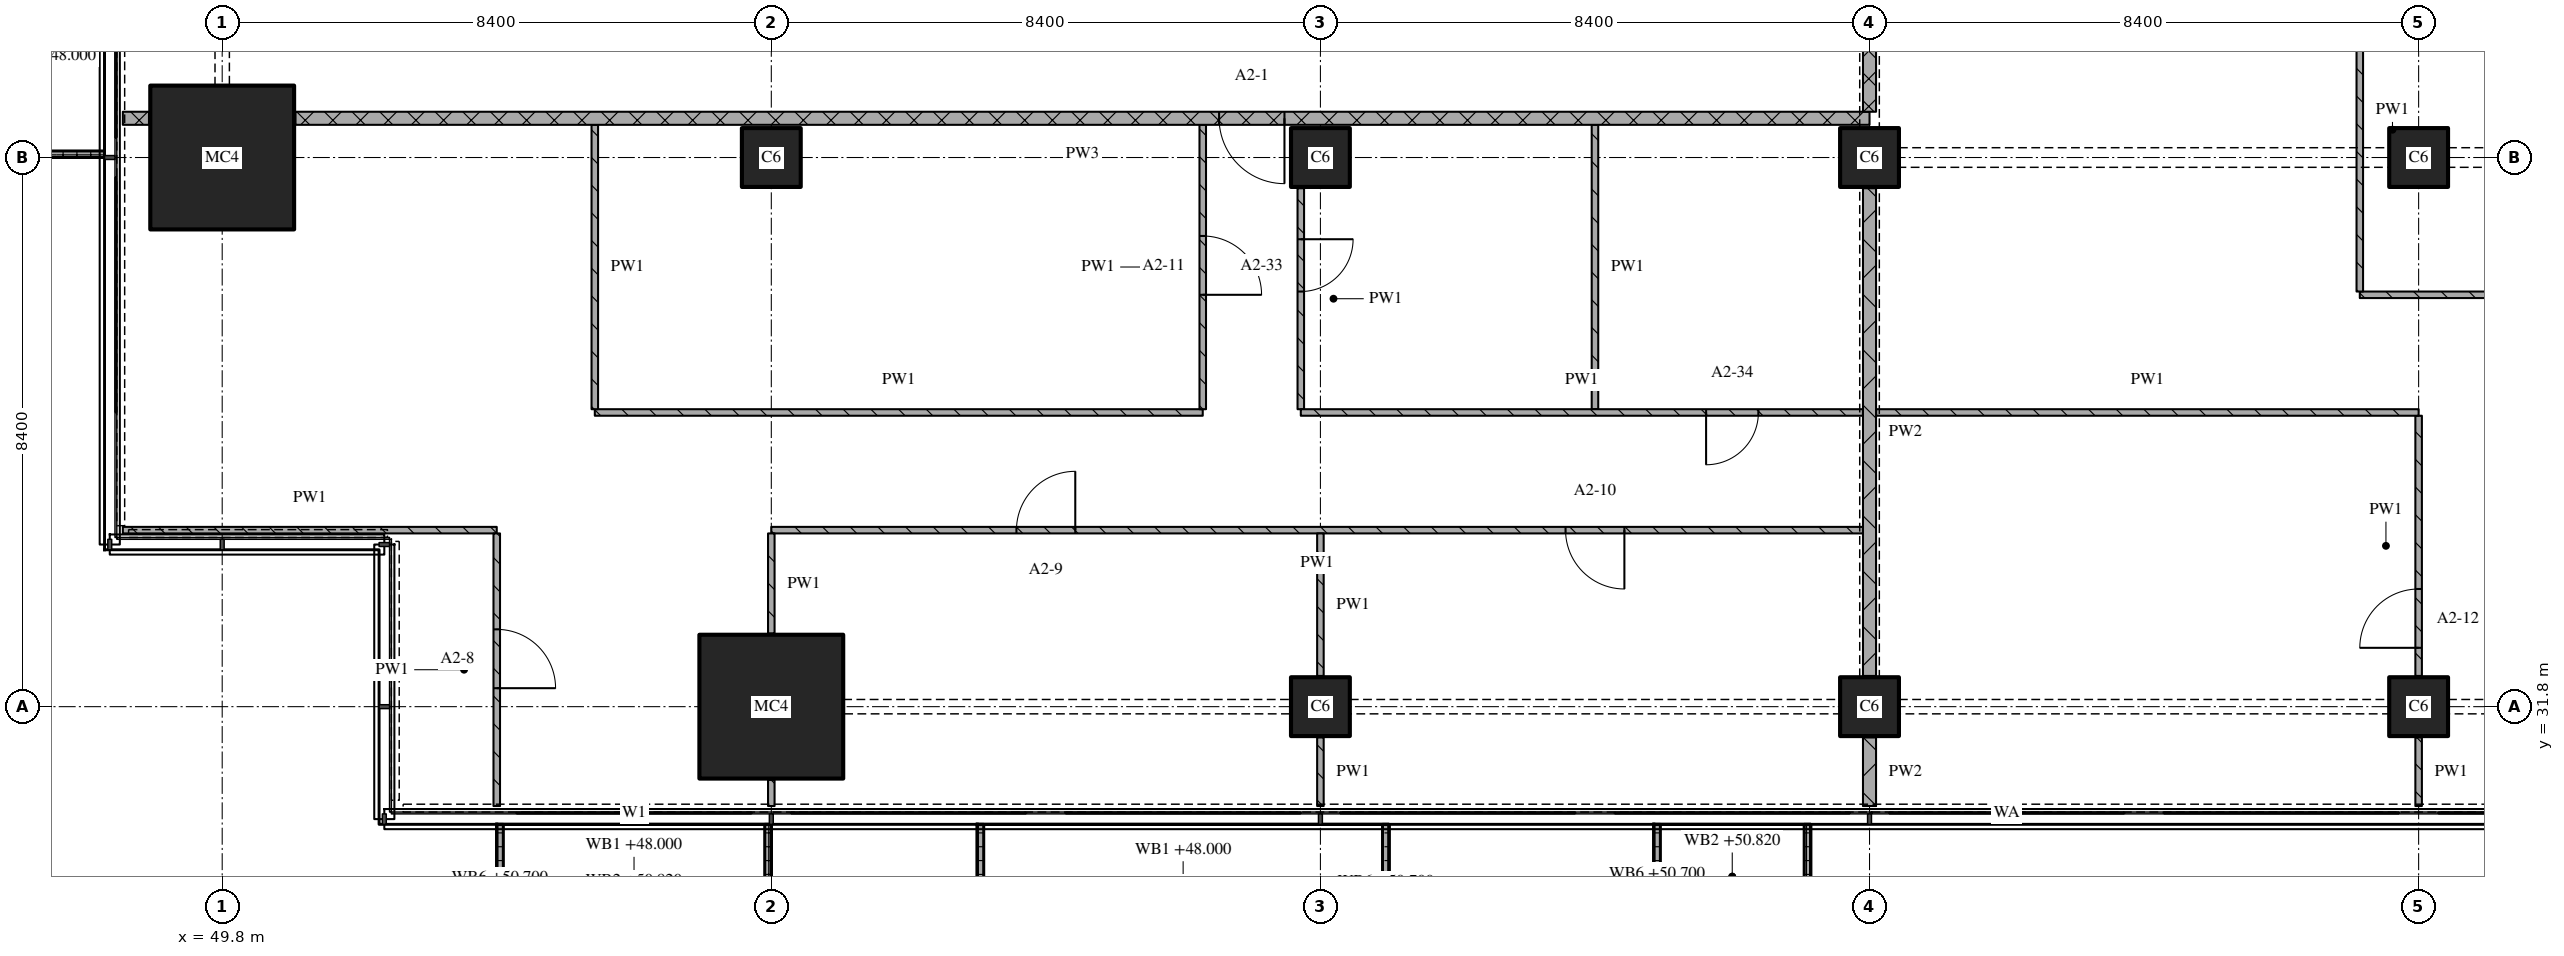
"""IFC4 building model, lengths in metres.
Left out: names, types, materials, properties, quantities, classifications, styles, units other than length and angle.
Written with IfcOpenShell. Run it as: python <this file> out.ifc"""

import sys

from ifc_helpers import new_model, si_unit, direction, frame, frame_2d, origin, origin_2d, place, context, subcontext, project, spatial, polyline, rectangle, outline, extrude, element, fill, save


model = new_model("IFC4")
c1 = context("Model", 3, precision=1e-05, world=origin(), true_north=direction((0.0, 1.0)))
c2 = subcontext(c1, "Body", "Model", "MODEL_VIEW")
j1 = project(units=[si_unit("LENGTHUNIT", "METRE"), si_unit("PLANEANGLEUNIT", "RADIAN")], contexts=[c1])
p1 = place(None, origin())
s1 = spatial("IfcSite", under=j1, at=p1, CompositionType="ELEMENT")
p2 = place(p1, origin())
s2 = spatial("IfcBuilding", under=s1, at=p2, CompositionType="ELEMENT")
p3 = place(p2, frame((0.0, 0.0, 48.0)))
s3 = spatial("IfcBuildingStorey", under=s2, at=p3, CompositionType="ELEMENT", Elevation=48.0)
for number, where, z_axis, x_axis in (
    (1, (49.8, 40.2, 0.0), (0.0, 0.0, 1.0), (1.0, 0.0, 0.0)),
    (2, (58.2, 31.8, 0.0), (0.0, 0.0, 1.0), (1.0, 0.0, 0.0)),
):
    element("IfcColumn", number, at=place(p3, frame(where, z_axis=z_axis, x_axis=x_axis)), inside=s3, PredefinedType="COLUMN", context=c2, shape_type="SweptSolid", body=[
        extrude(rectangle(XDim=2.2, YDim=2.2, at=origin_2d()), origin(), (0.0, 0.0, 1.0), 3.6),
    ])
for number, where, z_axis, x_axis in (
    (3, (58.2, 40.2, 0.0), (0.0, 0.0, 1.0), (1.0, 0.0, 0.0)),
    (4, (66.6, 31.8, 0.0), (0.0, 0.0, 1.0), (1.0, 0.0, 0.0)),
    (5, (66.6, 40.2, 0.0), (0.0, 0.0, 1.0), (1.0, 0.0, 0.0)),
    (6, (75.0, 31.8, 0.0), (0.0, 0.0, 1.0), (1.0, 0.0, 0.0)),
    (7, (75.0, 40.2, 0.0), (0.0, 0.0, 1.0), (1.0, 0.0, 0.0)),
    (8, (83.4, 31.8, 0.0), (0.0, 0.0, 1.0), (1.0, 0.0, 0.0)),
    (9, (83.4, 40.2, 0.0), (0.0, 0.0, 1.0), (1.0, 0.0, 0.0)),
):
    element("IfcColumn", number, at=place(p3, frame(where, z_axis=z_axis, x_axis=x_axis)), inside=s3, PredefinedType="COLUMN", context=c2, shape_type="SweptSolid", body=[
        extrude(rectangle(XDim=0.9, YDim=0.9, at=origin_2d()), origin(), (0.0, 0.0, 1.0), 3.6),
    ])
p4 = place(p3, origin())
e10 = element("IfcWall", 10, at=p4, inside=s3, PredefinedType="SOLIDWALL", context=c2, shape_type="SweptSolid", body=[
    extrude(outline(polyline([(54.0, 30.0), (54.1, 30.0), (54.1, 28.367), (58.1, 28.367), (58.1, 30.0), (58.2, 30.0), (58.2, 28.267), (54.0, 28.267), (54.0, 30.0)])), origin(), (0.0, 0.0, 1.0), 1.0),
])
p5 = place(p3, origin())
e11 = element("IfcWall", 11, at=p5, inside=s3, PredefinedType="SOLIDWALL", context=c2, shape_type="SweptSolid", body=[
    extrude(outline(polyline([(61.35, 30.0), (61.45, 30.0), (61.45, 28.233), (67.55, 28.233), (67.55, 30.0), (67.65, 30.0), (67.65, 28.133), (61.35, 28.133), (61.35, 30.0)])), origin(), (0.0, 0.0, 1.0), 1.0),
])
p6 = place(p3, origin())
e12 = element("IfcWall", 12, at=p6, inside=s3, PredefinedType="SOLIDWALL", context=c2, shape_type="SweptSolid", body=[
    extrude(outline(polyline([(71.7, 30.0), (71.8, 30.0), (71.8, 28.5), (74.0, 28.5), (74.0, 30.0), (74.1, 30.0), (74.1, 28.4), (71.7, 28.4), (71.7, 30.0)])), origin(), (0.0, 0.0, 1.0), 1.0),
])
p7 = place(p3, origin())
e13 = element("IfcWall", 13, at=p7, inside=s3, PredefinedType="SOLIDWALL", context=c2, shape_type="SweptSolid", body=[
    extrude(outline(polyline([(48.0, 44.4), (48.0, 44.3), (46.367, 44.3), (46.367, 40.3), (48.0, 40.3), (48.0, 40.2), (46.267, 40.2), (46.267, 44.4), (48.0, 44.4)])), origin(), (0.0, 0.0, 1.0), 1.0),
])
p8 = place(p3, frame((48.28, 34.5, 0.0), z_axis=(0.0, 0.0, 1.0), x_axis=(1.0, 0.0, 0.0)))
e14 = element("IfcWall", 14, at=p8, inside=s3, PredefinedType="PARTITIONING", context=c2, shape_type="SweptSolid", body=[
    extrude(rectangle(XDim=5.72, YDim=0.1, at=frame_2d((2.86, 0.0))), origin(), (0.0, 0.0, 1.0), 3.32),
])
p9 = place(p3, frame((74.9, 34.5, 0.0), z_axis=(0.0, 0.0, 1.0), x_axis=(-1.0, 0.0, 0.0)))
e15 = element("IfcWall", 15, at=p9, inside=s3, PredefinedType="PARTITIONING", context=c2, shape_type="SweptSolid", body=[
    extrude(rectangle(XDim=16.7, YDim=0.1, at=frame_2d((8.35, 0.0))), origin(), (0.0, 0.0, 1.0), 3.32),
])
p10 = place(p9, frame((3.65, 0.0, 0.0)))
e16 = element("IfcOpeningElement", 16, at=p10, cuts=e15, PredefinedType="OPENING", context=c2, shape_type="SweptSolid", body=[
    extrude(rectangle(XDim=0.9, YDim=2.1, at=frame_2d((0.45, 1.05))), frame((0.0, 0.06, 0.0), z_axis=(0.0, -1.0, 0.0), x_axis=(1.0, 0.0, 0.0)), (0.0, 0.0, 1.0), 0.12),
])
p11 = place(p9, frame((12.05, 0.0, 0.0)))
e17 = element("IfcOpeningElement", 17, at=p11, cuts=e15, PredefinedType="OPENING", context=c2, shape_type="SweptSolid", body=[
    extrude(rectangle(XDim=0.9, YDim=2.1, at=frame_2d((0.45, 1.05))), frame((0.0, 0.06, 0.0), z_axis=(0.0, -1.0, 0.0), x_axis=(1.0, 0.0, 0.0)), (0.0, 0.0, 1.0), 0.12),
])
p12 = place(p3, frame((55.5, 36.3, 0.0), z_axis=(0.0, 0.0, 1.0), x_axis=(1.0, 0.0, 0.0)))
e18 = element("IfcWall", 18, at=p12, inside=s3, PredefinedType="PARTITIONING", context=c2, shape_type="SweptSolid", body=[
    extrude(rectangle(XDim=9.3, YDim=0.1, at=frame_2d((4.65, 0.0))), origin(), (0.0, 0.0, 1.0), 3.32),
])
p13 = place(p3, frame((82.5, 38.1, 0.0), z_axis=(0.0, 0.0, 1.0), x_axis=(1.0, 0.0, 0.0)))
e19 = element("IfcWall", 19, at=p13, inside=s3, PredefinedType="PARTITIONING", context=c2, shape_type="SweptSolid", body=[
    extrude(rectangle(XDim=8.4, YDim=0.1, at=frame_2d((4.2, 0.0))), origin(), (0.0, 0.0, 1.0), 3.32),
])
p14 = place(p3, frame((48.28, 40.8, 0.0), z_axis=(0.0, 0.0, 1.0), x_axis=(1.0, 0.0, 0.0)))
e20 = element("IfcWall", 20, at=p14, inside=s3, PredefinedType="PARTITIONING", context=c2, shape_type="SweptSolid", body=[
    extrude(rectangle(XDim=0.4, YDim=0.2, at=frame_2d((0.2, 0.0))), origin(), (0.0, 0.0, 1.0), 3.32),
])
p15 = place(p3, frame((75.0, 40.8, 0.0), z_axis=(0.0, 0.0, 1.0), x_axis=(-1.0, 0.0, 0.0)))
e21 = element("IfcWall", 21, at=p15, inside=s3, PredefinedType="PARTITIONING", context=c2, shape_type="SweptSolid", body=[
    extrude(rectangle(XDim=24.08, YDim=0.2, at=frame_2d((12.04, 0.0))), origin(), (0.0, 0.0, 1.0), 3.32),
])
p16 = place(p15, frame((8.95, 0.0, 0.0)))
e22 = element("IfcOpeningElement", 22, at=p16, cuts=e21, PredefinedType="OPENING", context=c2, shape_type="SweptSolid", body=[
    extrude(rectangle(XDim=1.0, YDim=2.1, at=frame_2d((0.5, 1.05))), frame((0.0, 0.11, 0.0), z_axis=(0.0, -1.0, 0.0), x_axis=(1.0, 0.0, 0.0)), (0.0, 0.0, 1.0), 0.22),
])
p17 = place(p3, frame((54.0, 30.28, 0.0), z_axis=(0.0, 0.0, 1.0), x_axis=(0.0, 1.0, 0.0)))
e23 = element("IfcWall", 23, at=p17, inside=s3, PredefinedType="PARTITIONING", context=c2, shape_type="SweptSolid", body=[
    extrude(rectangle(XDim=4.17, YDim=0.1, at=frame_2d((2.085, 0.0))), origin(), (0.0, 0.0, 1.0), 3.32),
])
p18 = place(p17, frame((1.803, 0.0, 0.0)))
e24 = element("IfcOpeningElement", 24, at=p18, cuts=e23, PredefinedType="OPENING", context=c2, shape_type="SweptSolid", body=[
    extrude(rectangle(XDim=0.9, YDim=2.1, at=frame_2d((0.45, 1.05))), frame((0.0, 0.06, 0.0), z_axis=(0.0, -1.0, 0.0), x_axis=(1.0, 0.0, 0.0)), (0.0, 0.0, 1.0), 0.12),
])
p19 = place(p3, frame((55.5, 40.7, 0.0), z_axis=(0.0, 0.0, 1.0), x_axis=(0.0, -1.0, 0.0)))
e25 = element("IfcWall", 25, at=p19, inside=s3, PredefinedType="PARTITIONING", context=c2, shape_type="SweptSolid", body=[
    extrude(rectangle(XDim=4.35, YDim=0.1, at=frame_2d((2.175, 0.0))), origin(), (0.0, 0.0, 1.0), 3.32),
])
p20 = place(p3, frame((58.2, 30.68, 0.0), z_axis=(0.0, 0.0, 1.0), x_axis=(0.0, -1.0, 0.0)))
e26 = element("IfcWall", 26, at=p20, inside=s3, PredefinedType="PARTITIONING", context=c2, shape_type="SweptSolid", body=[
    extrude(rectangle(XDim=0.4, YDim=0.1, at=frame_2d((0.2, 0.0))), origin(), (0.0, 0.0, 1.0), 3.32),
])
p21 = place(p3, frame((58.2, 34.45, 0.0), z_axis=(0.0, 0.0, 1.0), x_axis=(0.0, -1.0, 0.0)))
e27 = element("IfcWall", 27, at=p21, inside=s3, PredefinedType="PARTITIONING", context=c2, shape_type="SweptSolid", body=[
    extrude(rectangle(XDim=1.53, YDim=0.1, at=frame_2d((0.765, 0.0))), origin(), (0.0, 0.0, 1.0), 3.32),
])
p22 = place(p3, frame((64.8, 36.35, 0.0), z_axis=(0.0, 0.0, 1.0), x_axis=(0.0, 1.0, 0.0)))
e28 = element("IfcWall", 28, at=p22, inside=s3, PredefinedType="PARTITIONING", context=c2, shape_type="SweptSolid", body=[
    extrude(rectangle(XDim=4.35, YDim=0.1, at=frame_2d((2.175, 0.0))), origin(), (0.0, 0.0, 1.0), 3.32),
])
p23 = place(p22, frame((1.75, 0.0, 0.0)))
e29 = element("IfcOpeningElement", 29, at=p23, cuts=e28, PredefinedType="OPENING", context=c2, shape_type="SweptSolid", body=[
    extrude(rectangle(XDim=0.9, YDim=2.1, at=frame_2d((0.45, 1.05))), frame((0.0, 0.06, 0.0), z_axis=(0.0, -1.0, 0.0), x_axis=(1.0, 0.0, 0.0)), (0.0, 0.0, 1.0), 0.12),
])
p24 = place(p3, frame((66.3, 39.73, 0.0), z_axis=(0.0, 0.0, 1.0), x_axis=(0.0, -1.0, 0.0)))
e30 = element("IfcWall", 30, at=p24, inside=s3, PredefinedType="PARTITIONING", context=c2, shape_type="SweptSolid", body=[
    extrude(rectangle(XDim=3.38, YDim=0.1, at=frame_2d((1.69, 0.0))), origin(), (0.0, 0.0, 1.0), 3.32),
])
p25 = place(p24, frame((0.78, 0.0, 0.0)))
e31 = element("IfcOpeningElement", 31, at=p25, cuts=e30, PredefinedType="OPENING", context=c2, shape_type="SweptSolid", body=[
    extrude(rectangle(XDim=0.8, YDim=2.1, at=frame_2d((0.4, 1.05))), frame((0.0, 0.06, 0.0), z_axis=(0.0, -1.0, 0.0), x_axis=(1.0, 0.0, 0.0)), (0.0, 0.0, 1.0), 0.12),
])
p26 = place(p3, frame((66.6, 31.33, 0.0), z_axis=(0.0, 0.0, 1.0), x_axis=(0.0, -1.0, 0.0)))
e32 = element("IfcWall", 32, at=p26, inside=s3, PredefinedType="PARTITIONING", context=c2, shape_type="SweptSolid", body=[
    extrude(rectangle(XDim=1.05, YDim=0.1, at=frame_2d((0.525, 0.0))), origin(), (0.0, 0.0, 1.0), 3.32),
])
p27 = place(p3, frame((66.6, 34.45, 0.0), z_axis=(0.0, 0.0, 1.0), x_axis=(0.0, -1.0, 0.0)))
e33 = element("IfcWall", 33, at=p27, inside=s3, PredefinedType="PARTITIONING", context=c2, shape_type="SweptSolid", body=[
    extrude(rectangle(XDim=2.18, YDim=0.1, at=frame_2d((1.09, 0.0))), origin(), (0.0, 0.0, 1.0), 3.32),
])
p28 = place(p3, frame((70.8, 40.7, 0.0), z_axis=(0.0, 0.0, 1.0), x_axis=(0.0, -1.0, 0.0)))
e34 = element("IfcWall", 34, at=p28, inside=s3, PredefinedType="PARTITIONING", context=c2, shape_type="SweptSolid", body=[
    extrude(rectangle(XDim=4.35, YDim=0.1, at=frame_2d((2.175, 0.0))), origin(), (0.0, 0.0, 1.0), 3.32),
])
p29 = place(p3, frame((75.0, 43.1, 0.0), z_axis=(0.0, 0.0, 1.0), x_axis=(0.0, -1.0, 0.0)))
e35 = element("IfcWall", 35, at=p29, inside=s3, PredefinedType="PARTITIONING", context=c2, shape_type="SweptSolid", body=[
    extrude(rectangle(XDim=2.2, YDim=0.2, at=frame_2d((1.1, 0.0))), origin(), (0.0, 0.0, 1.0), 2.43),
])
p30 = place(p3, frame((75.0, 31.33, 0.0), z_axis=(0.0, 0.0, 1.0), x_axis=(0.0, -1.0, 0.0)))
e36 = element("IfcWall", 36, at=p30, inside=s3, PredefinedType="PARTITIONING", context=c2, shape_type="SweptSolid", body=[
    extrude(rectangle(XDim=1.05, YDim=0.2, at=frame_2d((0.525, 0.0))), origin(), (0.0, 0.0, 1.0), 3.32),
])
p31 = place(p3, frame((75.0, 39.73, 0.0), z_axis=(0.0, 0.0, 1.0), x_axis=(0.0, -1.0, 0.0)))
e37 = element("IfcWall", 37, at=p31, inside=s3, PredefinedType="PARTITIONING", context=c2, shape_type="SweptSolid", body=[
    extrude(rectangle(XDim=7.46, YDim=0.2, at=frame_2d((3.73, 0.0))), origin(), (0.0, 0.0, 1.0), 2.83),
])
p32 = place(p3, frame((82.5, 43.1, 0.0), z_axis=(0.0, 0.0, 1.0), x_axis=(0.0, -1.0, 0.0)))
e38 = element("IfcWall", 38, at=p32, inside=s3, PredefinedType="PARTITIONING", context=c2, shape_type="SweptSolid", body=[
    extrude(rectangle(XDim=4.95, YDim=0.1, at=frame_2d((2.475, 0.0))), origin(), (0.0, 0.0, 1.0), 3.32),
])
p33 = place(p3, frame((83.4, 31.33, 0.0), z_axis=(0.0, 0.0, 1.0), x_axis=(0.0, -1.0, 0.0)))
e39 = element("IfcWall", 39, at=p33, inside=s3, PredefinedType="PARTITIONING", context=c2, shape_type="SweptSolid", body=[
    extrude(rectangle(XDim=1.05, YDim=0.1, at=frame_2d((0.525, 0.0))), origin(), (0.0, 0.0, 1.0), 3.32),
])
p34 = place(p3, frame((83.4, 32.27, 0.0), z_axis=(0.0, 0.0, 1.0), x_axis=(0.0, 1.0, 0.0)))
e40 = element("IfcWall", 40, at=p34, inside=s3, PredefinedType="PARTITIONING", context=c2, shape_type="SweptSolid", body=[
    extrude(rectangle(XDim=3.98, YDim=0.1, at=frame_2d((1.99, 0.0))), origin(), (0.0, 0.0, 1.0), 3.32),
])
p35 = place(p34, frame((0.43, 0.0, 0.0)))
e41 = element("IfcOpeningElement", 41, at=p35, cuts=e40, PredefinedType="OPENING", context=c2, shape_type="SweptSolid", body=[
    extrude(rectangle(XDim=0.9, YDim=2.1, at=frame_2d((0.45, 1.05))), frame((0.0, 0.06, 0.0), z_axis=(0.0, -1.0, 0.0), x_axis=(1.0, 0.0, 0.0)), (0.0, 0.0, 1.0), 0.12),
])
p36 = place(p3, frame((66.3, 36.3, 0.0), z_axis=(0.0, 0.0, 1.0), x_axis=(1.0, 0.0, 0.0)))
e42 = element("IfcWall", 42, at=p36, inside=s3, PredefinedType="PARTITIONING", context=c2, shape_type="SweptSolid", body=[
    extrude(rectangle(XDim=8.6, YDim=0.1, at=frame_2d((4.3, 0.0))), origin(), (0.0, 0.0, 1.0), 3.32),
])
p37 = place(p36, frame((6.2, 0.0, 0.0)))
e43 = element("IfcOpeningElement", 43, at=p37, cuts=e42, PredefinedType="OPENING", context=c2, shape_type="SweptSolid", body=[
    extrude(rectangle(XDim=0.8, YDim=2.1, at=frame_2d((0.4, 1.05))), frame((0.0, 0.06, 0.0), z_axis=(0.0, -1.0, 0.0), x_axis=(1.0, 0.0, 0.0)), (0.0, 0.0, 1.0), 0.12),
])
p38 = place(p3, frame((75.1, 36.3, 0.0), z_axis=(0.0, 0.0, 1.0), x_axis=(1.0, 0.0, 0.0)))
e44 = element("IfcWall", 44, at=p38, inside=s3, PredefinedType="PARTITIONING", context=c2, shape_type="SweptSolid", body=[
    extrude(rectangle(XDim=8.3, YDim=0.1, at=frame_2d((4.15, 0.0))), origin(), (0.0, 0.0, 1.0), 3.32),
])
p39 = place(p10, origin())
e45 = element("IfcDoor", 45, at=p39, inside=s3, OperationType="SINGLE_SWING_LEFT", PredefinedType="DOOR", context=c2, shape_type="SweptSolid", body=[
    extrude(rectangle(XDim=0.9, YDim=2.1, at=frame_2d((0.45, 1.05))), frame((0.0, 0.025, 0.0), z_axis=(0.0, -1.0, 0.0), x_axis=(1.0, 0.0, 0.0)), (0.0, 0.0, 1.0), 0.05),
])
fill(e16, e45)
p40 = place(p11, origin())
e46 = element("IfcDoor", 46, at=p40, inside=s3, OperationType="SINGLE_SWING_RIGHT", PredefinedType="DOOR", context=c2, shape_type="SweptSolid", body=[
    extrude(rectangle(XDim=0.9, YDim=2.1, at=frame_2d((0.45, 1.05))), frame((0.0, 0.025, 0.0), z_axis=(0.0, -1.0, 0.0), x_axis=(1.0, 0.0, 0.0)), (0.0, 0.0, 1.0), 0.05),
])
fill(e17, e46)
p41 = place(p16, origin())
e47 = element("IfcDoor", 47, at=p41, inside=s3, OperationType="SINGLE_SWING_LEFT", PredefinedType="DOOR", context=c2, shape_type="SweptSolid", body=[
    extrude(rectangle(XDim=1.0, YDim=2.1, at=frame_2d((0.5, 1.05))), frame((0.0, 0.025, 0.0), z_axis=(0.0, -1.0, 0.0), x_axis=(1.0, 0.0, 0.0)), (0.0, 0.0, 1.0), 0.05),
])
fill(e22, e47)
p42 = place(p18, origin())
e48 = element("IfcDoor", 48, at=p42, inside=s3, OperationType="SINGLE_SWING_RIGHT", PredefinedType="DOOR", context=c2, shape_type="SweptSolid", body=[
    extrude(rectangle(XDim=0.9, YDim=2.1, at=frame_2d((0.45, 1.05))), frame((0.0, 0.025, 0.0), z_axis=(0.0, -1.0, 0.0), x_axis=(1.0, 0.0, 0.0)), (0.0, 0.0, 1.0), 0.05),
])
fill(e24, e48)
p43 = place(p23, origin())
e49 = element("IfcDoor", 49, at=p43, inside=s3, OperationType="SINGLE_SWING_RIGHT", PredefinedType="DOOR", context=c2, shape_type="SweptSolid", body=[
    extrude(rectangle(XDim=0.9, YDim=2.1, at=frame_2d((0.45, 1.05))), frame((0.0, 0.025, 0.0), z_axis=(0.0, -1.0, 0.0), x_axis=(1.0, 0.0, 0.0)), (0.0, 0.0, 1.0), 0.05),
])
fill(e29, e49)
p44 = place(p25, origin())
e50 = element("IfcDoor", 50, at=p44, inside=s3, OperationType="SINGLE_SWING_LEFT", PredefinedType="DOOR", context=c2, shape_type="SweptSolid", body=[
    extrude(rectangle(XDim=0.8, YDim=2.1, at=frame_2d((0.4, 1.05))), frame((0.0, 0.025, 0.0), z_axis=(0.0, -1.0, 0.0), x_axis=(1.0, 0.0, 0.0)), (0.0, 0.0, 1.0), 0.05),
])
fill(e31, e50)
p45 = place(p35, origin())
e51 = element("IfcDoor", 51, at=p45, inside=s3, OperationType="SINGLE_SWING_LEFT", PredefinedType="DOOR", context=c2, shape_type="SweptSolid", body=[
    extrude(rectangle(XDim=0.9, YDim=2.1, at=frame_2d((0.45, 1.05))), frame((0.0, 0.025, 0.0), z_axis=(0.0, -1.0, 0.0), x_axis=(1.0, 0.0, 0.0)), (0.0, 0.0, 1.0), 0.05),
])
fill(e41, e51)
p46 = place(p37, origin())
e52 = element("IfcDoor", 52, at=p46, inside=s3, OperationType="SINGLE_SWING_RIGHT", PredefinedType="DOOR", context=c2, shape_type="SweptSolid", body=[
    extrude(rectangle(XDim=0.8, YDim=2.1, at=frame_2d((0.4, 1.05))), frame((0.0, 0.025, 0.0), z_axis=(0.0, -1.0, 0.0), x_axis=(1.0, 0.0, 0.0)), (0.0, 0.0, 1.0), 0.05),
])
fill(e43, e52)
save(model, sys.argv[1])
